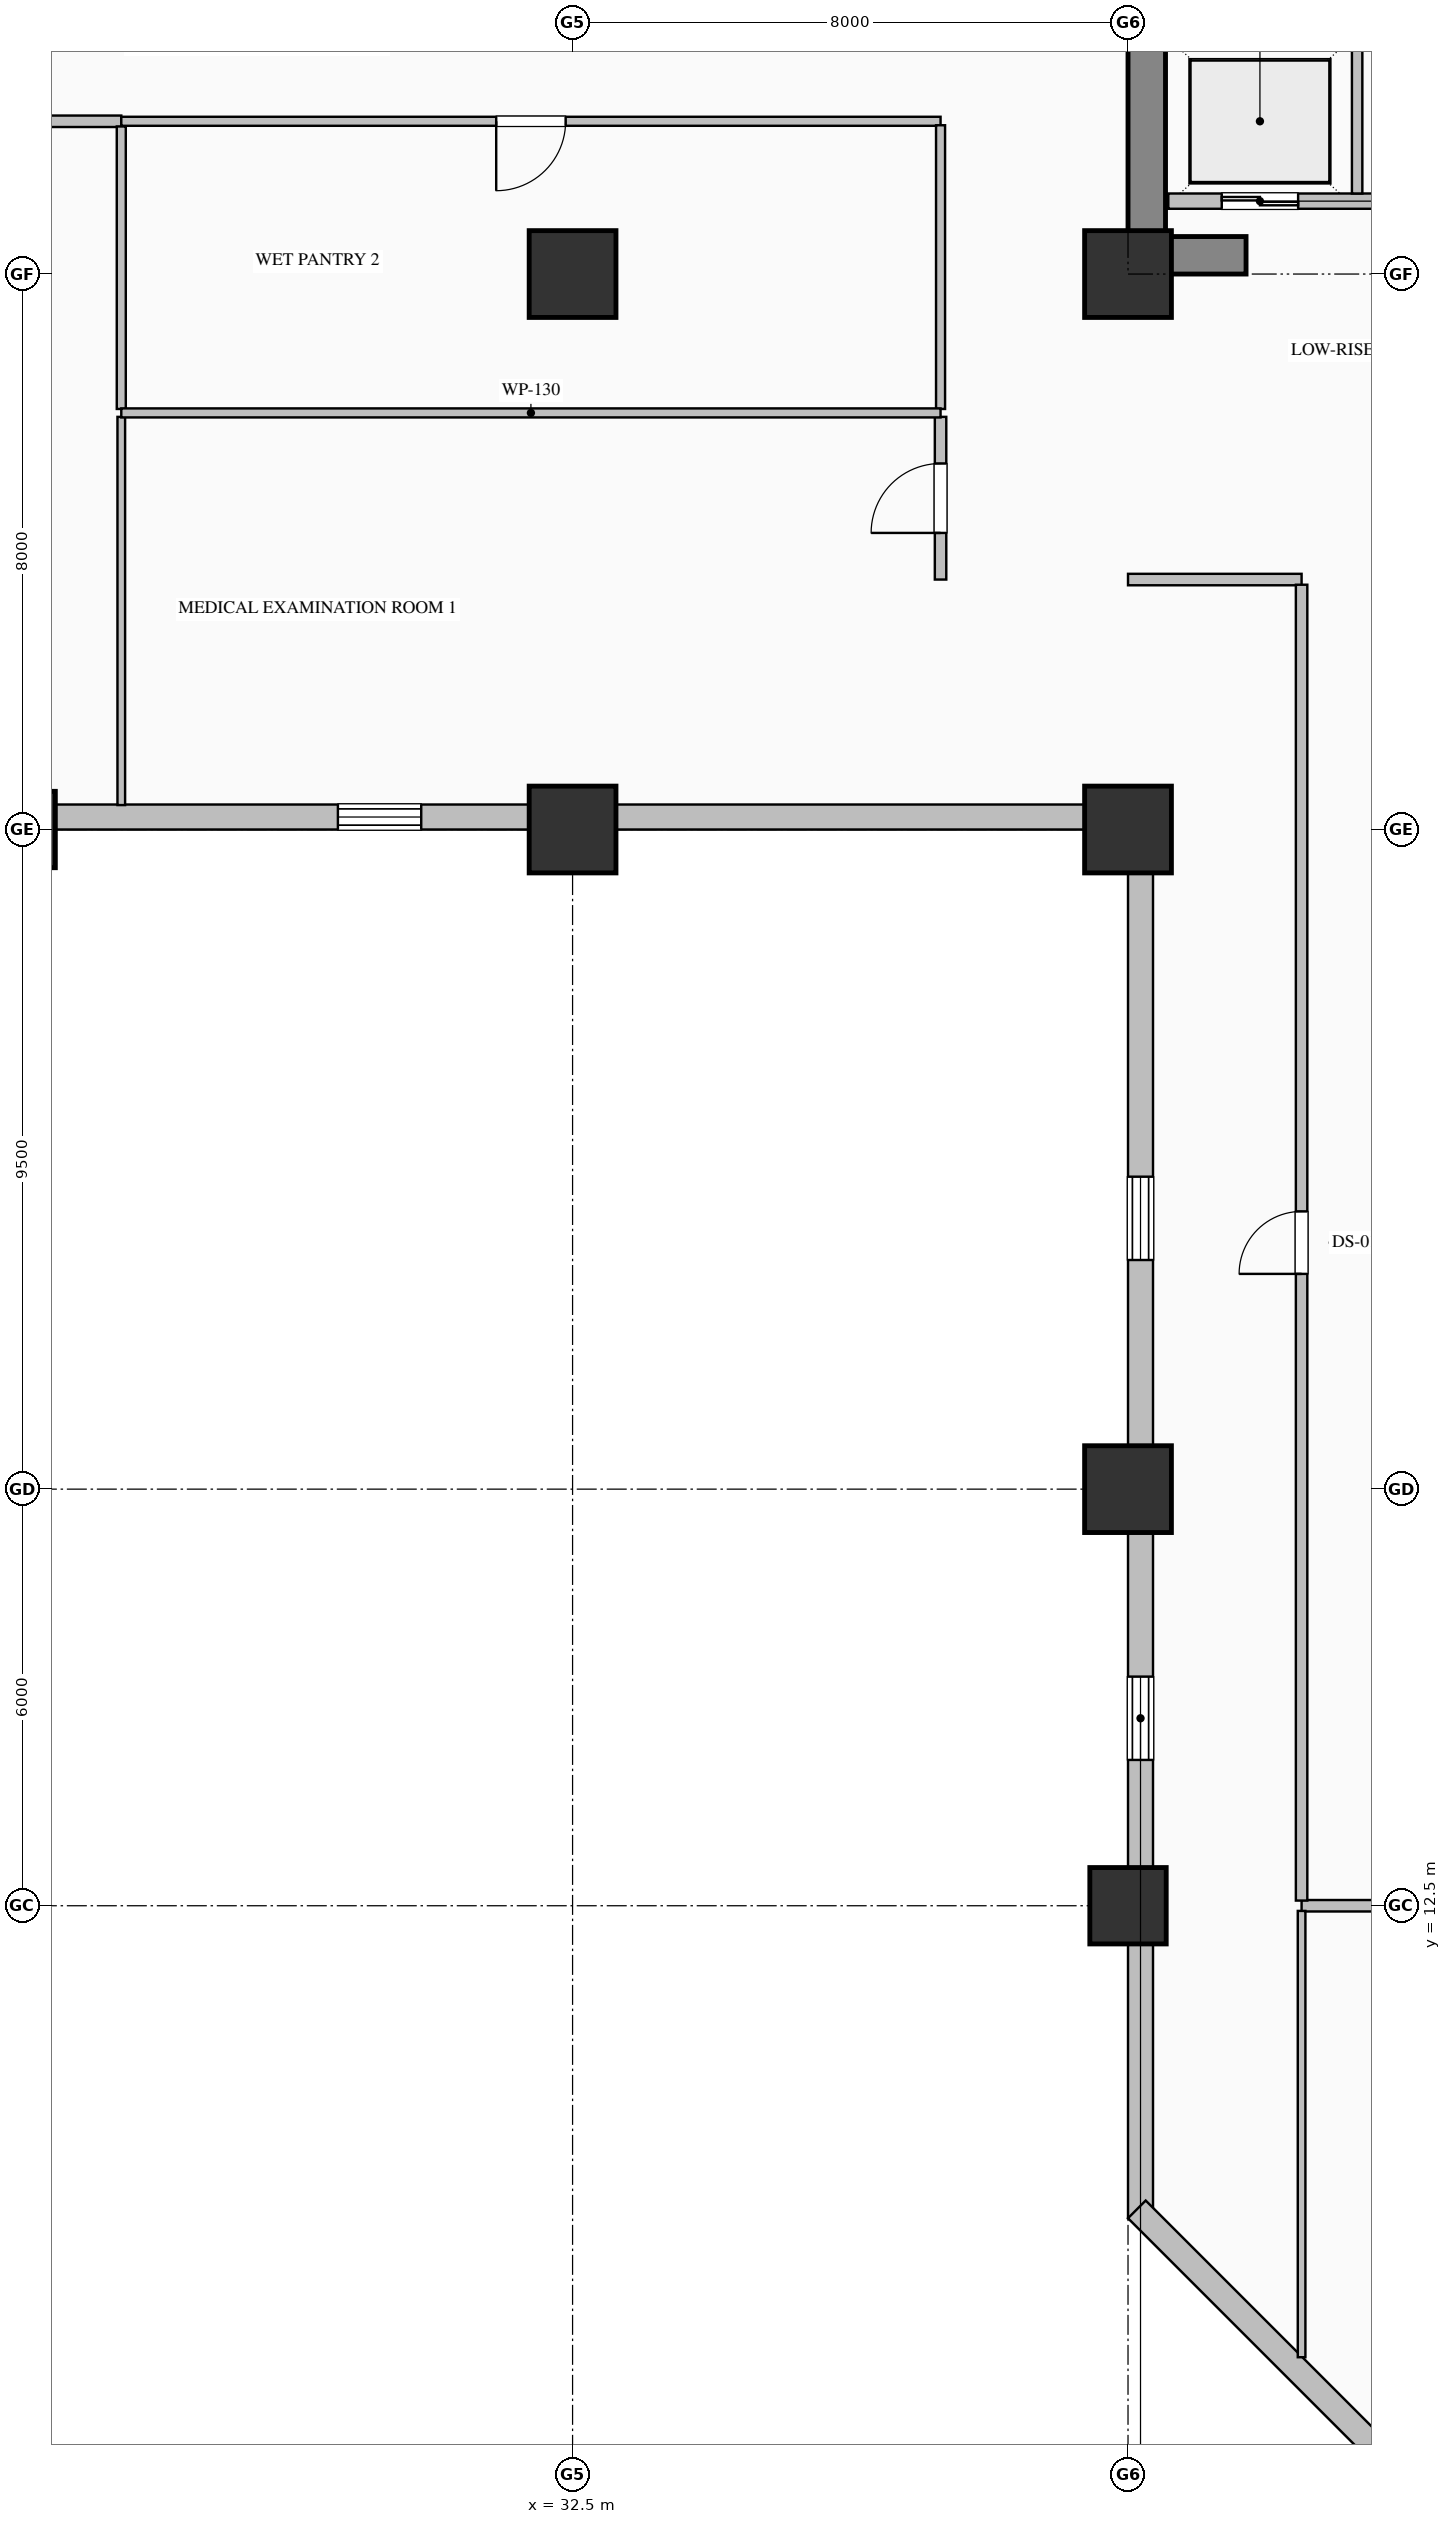
"""IFC4 building model, lengths in metres.
Left out: names, types, materials, properties, quantities, classifications, styles, units other than length and angle.
Written with IfcOpenShell. Run it as: python <this file> out.ifc"""

import sys

from ifc_helpers import new_model, si_unit, direction, frame, frame_2d, origin, origin_2d, place, context, subcontext, project, spatial, rectangle, hollow_rectangle, extrude, element, fill, save


model = new_model("IFC4")
c1 = context("Model", 3, precision=1e-05, world=origin(), true_north=direction((0.0, 1.0)))
c2 = subcontext(c1, "Body", "Model", "MODEL_VIEW")
j1 = project(units=[si_unit("LENGTHUNIT", "METRE"), si_unit("PLANEANGLEUNIT", "RADIAN")], contexts=[c1])
p1 = place(None, origin())
s1 = spatial("IfcSite", under=j1, at=p1, CompositionType="ELEMENT")
p2 = place(p1, origin())
s2 = spatial("IfcBuilding", under=s1, at=p2, CompositionType="ELEMENT")
p3 = place(p2, frame((0.0, 0.0, 88.2)))
s3 = spatial("IfcBuildingStorey", under=s2, at=p3, CompositionType="ELEMENT", Elevation=88.2)
p4 = place(p3, frame((40.77, 36.54, 0.0), z_axis=(0.0, 0.0, 1.0), x_axis=(0.0, 1.0, 0.0)))
e1 = element("IfcWall", 1, at=p4, inside=s3, PredefinedType="SHEAR", context=c2, shape_type="SweptSolid", body=[
    extrude(rectangle(XDim=7.86, YDim=0.54, at=frame_2d((3.93, 0.0))), origin(), (0.0, 0.0, 1.0), 3.75),
])
p5 = place(p3, frame((40.5, 36.27, 0.0), z_axis=(0.0, 0.0, 1.0), x_axis=(1.0, 0.0, 0.0)))
e2 = element("IfcWall", 2, at=p5, inside=s3, PredefinedType="SHEAR", context=c2, shape_type="SweptSolid", body=[
    extrude(rectangle(XDim=1.7, YDim=0.54, at=frame_2d((0.85, 0.0))), origin(), (0.0, 0.0, 1.0), 3.75),
])
p6 = place(p3, frame((24.5, 28.0, 0.0), z_axis=(0.0, 0.0, 1.0), x_axis=(1.0, 0.0, 0.0)))
e3 = element("IfcColumn", 3, at=p6, inside=s3, PredefinedType="COLUMN", context=c2, shape_type="SweptSolid", body=[
    extrude(hollow_rectangle(XDim=1.1, YDim=1.1, WallThickness=0.04, at=origin_2d()), origin(), (0.0, 0.0, 1.0), 4.0),
])
for number, where, z_axis, x_axis in (
    (4, (32.5, 28.0, 0.0), (0.0, 0.0, 1.0), (1.0, 0.0, 0.0)),
    (5, (32.5, 36.0, 0.0), (0.0, 0.0, 1.0), (1.0, 0.0, 0.0)),
):
    element("IfcColumn", number, at=place(p3, frame(where, z_axis=z_axis, x_axis=x_axis)), inside=s3, PredefinedType="COLUMN", context=c2, shape_type="SweptSolid", body=[
        extrude(hollow_rectangle(XDim=1.25, YDim=1.25, WallThickness=0.045, at=origin_2d()), origin(), (0.0, 0.0, 1.0), 4.0),
    ])
p7 = place(p3, frame((40.5, 12.5, 0.0), z_axis=(0.0, 0.0, 1.0), x_axis=(1.0, 0.0, 0.0)))
e6 = element("IfcColumn", 6, at=p7, inside=s3, PredefinedType="COLUMN", context=c2, shape_type="SweptSolid", body=[
    extrude(hollow_rectangle(XDim=1.1, YDim=1.1, WallThickness=0.04, at=origin_2d()), origin(), (0.0, 0.0, 1.0), 4.0),
])
for number, where, z_axis, x_axis in (
    (7, (40.5, 18.5, 0.0), (0.0, 0.0, 1.0), (1.0, 0.0, 0.0)),
    (8, (40.5, 28.0, 0.0), (0.0, 0.0, 1.0), (1.0, 0.0, 0.0)),
    (9, (40.5, 36.0, 0.0), (0.0, 0.0, 1.0), (1.0, 0.0, 0.0)),
):
    element("IfcColumn", number, at=place(p3, frame(where, z_axis=z_axis, x_axis=x_axis)), inside=s3, PredefinedType="COLUMN", context=c2, shape_type="SweptSolid", body=[
        extrude(hollow_rectangle(XDim=1.25, YDim=1.25, WallThickness=0.045, at=origin_2d()), origin(), (0.0, 0.0, 1.0), 4.0),
    ])
p8 = place(p3, frame((40.68, 8.0, 0.0), z_axis=(0.0, 0.0, 1.0), x_axis=(0.0, 1.0, 0.0)))
e10 = element("IfcWall", 10, at=p8, inside=s3, PredefinedType="SOLIDWALL", context=c2, shape_type="SweptSolid", body=[
    extrude(rectangle(XDim=20.36, YDim=0.36, at=frame_2d((10.18, 0.0))), origin(), (0.0, 0.0, 1.0), 3.05),
])
p9 = place(p8, frame((6.6, 0.0, 0.7)))
e11 = element("IfcOpeningElement", 11, at=p9, cuts=e10, PredefinedType="OPENING", context=c2, shape_type="SweptSolid", body=[
    extrude(rectangle(XDim=1.2, YDim=1.85, at=frame_2d((0.6, 0.925))), frame((0.0, 0.19, 0.0), z_axis=(0.0, -1.0, 0.0), x_axis=(1.0, 0.0, 0.0)), (0.0, 0.0, 1.0), 0.38),
])
p10 = place(p8, frame((13.8, 0.0, 0.7)))
e12 = element("IfcOpeningElement", 12, at=p10, cuts=e10, PredefinedType="OPENING", context=c2, shape_type="SweptSolid", body=[
    extrude(rectangle(XDim=1.2, YDim=1.85, at=frame_2d((0.6, 0.925))), frame((0.0, 0.19, 0.0), z_axis=(0.0, -1.0, 0.0), x_axis=(1.0, 0.0, 0.0)), (0.0, 0.0, 1.0), 0.38),
])
p11 = place(p3, frame((40.52, 28.18, 0.0), z_axis=(0.0, 0.0, 1.0), x_axis=(-1.0, 0.0, 0.0)))
e13 = element("IfcWall", 13, at=p11, inside=s3, PredefinedType="SOLIDWALL", context=c2, shape_type="SweptSolid", body=[
    extrude(rectangle(XDim=36.52, YDim=0.36, at=frame_2d((18.26, 0.0))), origin(), (0.0, 0.0, 1.0), 3.05),
])
p12 = place(p11, frame((10.2, 0.0, 0.7)))
e14 = element("IfcOpeningElement", 14, at=p12, cuts=e13, PredefinedType="OPENING", context=c2, shape_type="SweptSolid", body=[
    extrude(rectangle(XDim=1.2, YDim=1.85, at=frame_2d((0.6, 0.925))), frame((0.0, 0.19, 0.0), z_axis=(0.0, -1.0, 0.0), x_axis=(1.0, 0.0, 0.0)), (0.0, 0.0, 1.0), 0.38),
])
p13 = place(p11, frame((17.4, 0.0, 0.7)))
e15 = element("IfcOpeningElement", 15, at=p13, cuts=e13, PredefinedType="OPENING", context=c2, shape_type="SweptSolid", body=[
    extrude(rectangle(XDim=1.2, YDim=1.85, at=frame_2d((0.6, 0.925))), frame((0.0, 0.19, 0.0), z_axis=(0.0, -1.0, 0.0), x_axis=(1.0, 0.0, 0.0)), (0.0, 0.0, 1.0), 0.38),
])
p14 = place(p11, frame((21.0, 0.0, 0.7)))
e16 = element("IfcOpeningElement", 16, at=p14, cuts=e13, PredefinedType="OPENING", context=c2, shape_type="SweptSolid", body=[
    extrude(rectangle(XDim=1.2, YDim=1.85, at=frame_2d((0.6, 0.925))), frame((0.0, 0.19, 0.0), z_axis=(0.0, -1.0, 0.0), x_axis=(1.0, 0.0, 0.0)), (0.0, 0.0, 1.0), 0.38),
])
p15 = place(p11, frame((28.2, 0.0, 0.7)))
e17 = element("IfcOpeningElement", 17, at=p15, cuts=e13, PredefinedType="OPENING", context=c2, shape_type="SweptSolid", body=[
    extrude(rectangle(XDim=1.2, YDim=1.85, at=frame_2d((0.6, 0.925))), frame((0.0, 0.19, 0.0), z_axis=(0.0, -1.0, 0.0), x_axis=(1.0, 0.0, 0.0)), (0.0, 0.0, 1.0), 0.38),
])
p16 = place(p3, frame((44.627, 4.127, 0.0), z_axis=(0.0, 0.0, 1.0), x_axis=(-0.707106781187, 0.707106781187, 0.0)))
e18 = element("IfcWall", 18, at=p16, inside=s3, PredefinedType="SOLIDWALL", context=c2, shape_type="SweptSolid", body=[
    extrude(rectangle(XDim=5.657, YDim=0.36, at=frame_2d((2.828, 0.0))), origin(), (0.0, 0.0, 1.0), 3.75),
])
p17 = place(p3, frame((49.32, 37.05, 0.0), z_axis=(0.0, 0.0, 1.0), x_axis=(-1.0, 0.0, 0.0)))
e19 = element("IfcWall", 19, at=p17, inside=s3, PredefinedType="PARTITIONING", context=c2, shape_type="SweptSolid", body=[
    extrude(rectangle(XDim=8.24, YDim=0.22, at=frame_2d((4.12, 0.0))), origin(), (0.0, 0.0, 1.0), 3.75),
])
p18 = place(p17, frame((6.37, 0.0, 0.0)))
e20 = element("IfcOpeningElement", 20, at=p18, cuts=e19, PredefinedType="OPENING", context=c2, shape_type="SweptSolid", body=[
    extrude(rectangle(XDim=1.1, YDim=2.2, at=frame_2d((0.55, 1.1))), frame((0.0, 0.12, 0.0), z_axis=(0.0, -1.0, 0.0), x_axis=(1.0, 0.0, 0.0)), (0.0, 0.0, 1.0), 0.24),
])
p19 = place(p17, frame((3.57, 0.0, 0.0)))
e21 = element("IfcOpeningElement", 21, at=p19, cuts=e19, PredefinedType="OPENING", context=c2, shape_type="SweptSolid", body=[
    extrude(rectangle(XDim=1.1, YDim=2.2, at=frame_2d((0.55, 1.1))), frame((0.0, 0.12, 0.0), z_axis=(0.0, -1.0, 0.0), x_axis=(1.0, 0.0, 0.0)), (0.0, 0.0, 1.0), 0.24),
])
p20 = place(p17, frame((0.77, 0.0, 0.0)))
e22 = element("IfcOpeningElement", 22, at=p20, cuts=e19, PredefinedType="OPENING", context=c2, shape_type="SweptSolid", body=[
    extrude(rectangle(XDim=1.1, YDim=2.2, at=frame_2d((0.55, 1.1))), frame((0.0, 0.12, 0.0), z_axis=(0.0, -1.0, 0.0), x_axis=(1.0, 0.0, 0.0)), (0.0, 0.0, 1.0), 0.24),
])
p21 = place(p3, frame((43.8, 37.16, 0.0), z_axis=(0.0, 0.0, 1.0), x_axis=(0.0, 1.0, 0.0)))
e23 = element("IfcWall", 23, at=p21, inside=s3, PredefinedType="PARTITIONING", context=c2, shape_type="SweptSolid", body=[
    extrude(rectangle(XDim=2.08, YDim=0.15, at=frame_2d((1.04, 0.0))), origin(), (0.0, 0.0, 1.0), 3.75),
])
p22 = place(p3, frame((26.0, 38.2, 0.0), z_axis=(0.0, 0.0, 1.0), x_axis=(-1.0, 0.0, 0.0)))
e24 = element("IfcWall", 24, at=p22, inside=s3, PredefinedType="PARTITIONING", context=c2, shape_type="SweptSolid", body=[
    extrude(rectangle(XDim=17.0, YDim=0.165, at=frame_2d((8.5, 0.0))), origin(), (0.0, 0.0, 1.0), 3.75),
])
p23 = place(p22, frame((7.5, 0.0, 0.0)))
e25 = element("IfcOpeningElement", 25, at=p23, cuts=e24, PredefinedType="OPENING", context=c2, shape_type="SweptSolid", body=[
    extrude(rectangle(XDim=2.0, YDim=2.4, at=frame_2d((1.0, 1.2))), frame((0.0, 0.093, 0.0), z_axis=(0.0, -1.0, 0.0), x_axis=(1.0, 0.0, 0.0)), (0.0, 0.0, 1.0), 0.185),
])
p24 = place(p3, frame((37.8, 38.2, 0.0), z_axis=(0.0, 0.0, 1.0), x_axis=(-1.0, 0.0, 0.0)))
e26 = element("IfcWall", 26, at=p24, inside=s3, PredefinedType="PARTITIONING", context=c2, shape_type="SweptSolid", body=[
    extrude(rectangle(XDim=11.8, YDim=0.13, at=frame_2d((5.9, 0.0))), origin(), (0.0, 0.0, 1.0), 3.75),
])
p25 = place(p24, frame((5.4, 0.0, 0.0)))
e27 = element("IfcOpeningElement", 27, at=p25, cuts=e26, PredefinedType="OPENING", context=c2, shape_type="SweptSolid", body=[
    extrude(rectangle(XDim=1.0, YDim=2.15, at=frame_2d((0.5, 1.075))), frame((0.0, 0.075, 0.0), z_axis=(0.0, -1.0, 0.0), x_axis=(1.0, 0.0, 0.0)), (0.0, 0.0, 1.0), 0.15),
])
p26 = place(p3, frame((37.8, 31.6, 0.0), z_axis=(0.0, 0.0, 1.0), x_axis=(0.0, 1.0, 0.0)))
e28 = element("IfcWall", 28, at=p26, inside=s3, PredefinedType="PARTITIONING", context=c2, shape_type="SweptSolid", body=[
    extrude(rectangle(XDim=2.343, YDim=0.165, at=frame_2d((1.171, 0.0))), origin(), (0.0, 0.0, 1.0), 3.75),
])
p27 = place(p26, frame((0.671, 0.0, 0.0)))
e29 = element("IfcOpeningElement", 29, at=p27, cuts=e28, PredefinedType="OPENING", context=c2, shape_type="SweptSolid", body=[
    extrude(rectangle(XDim=1.0, YDim=2.15, at=frame_2d((0.5, 1.075))), frame((0.0, 0.093, 0.0), z_axis=(0.0, -1.0, 0.0), x_axis=(1.0, 0.0, 0.0)), (0.0, 0.0, 1.0), 0.185),
])
p28 = place(p3, frame((37.8, 34.057, 0.0), z_axis=(0.0, 0.0, 1.0), x_axis=(0.0, 1.0, 0.0)))
e30 = element("IfcWall", 30, at=p28, inside=s3, PredefinedType="PARTITIONING", context=c2, shape_type="SweptSolid", body=[
    extrude(rectangle(XDim=4.086, YDim=0.13, at=frame_2d((2.043, 0.0))), origin(), (0.0, 0.0, 1.0), 3.75),
])
p29 = place(p3, frame((43.0, 31.6, 0.0), z_axis=(0.0, 0.0, 1.0), x_axis=(-1.0, 0.0, 0.0)))
e31 = element("IfcWall", 31, at=p29, inside=s3, PredefinedType="PARTITIONING", context=c2, shape_type="SweptSolid", body=[
    extrude(rectangle(XDim=2.5, YDim=0.165, at=frame_2d((1.25, 0.0))), origin(), (0.0, 0.0, 1.0), 3.75),
])
p30 = place(p3, frame((45.2, 12.5, 0.0), z_axis=(0.0, 0.0, 1.0), x_axis=(-1.0, 0.0, 0.0)))
e32 = element("IfcWall", 32, at=p30, inside=s3, PredefinedType="PARTITIONING", context=c2, shape_type="SweptSolid", body=[
    extrude(rectangle(XDim=2.2, YDim=0.165, at=frame_2d((1.1, 0.0))), origin(), (0.0, 0.0, 1.0), 3.042),
])
p31 = place(p3, frame((43.0, 12.574, 0.0), z_axis=(0.0, 0.0, 1.0), x_axis=(0.0, 1.0, 0.0)))
e33 = element("IfcWall", 33, at=p31, inside=s3, PredefinedType="PARTITIONING", context=c2, shape_type="SweptSolid", body=[
    extrude(rectangle(XDim=18.951, YDim=0.165, at=frame_2d((9.476, 0.0))), origin(), (0.0, 0.0, 1.0), 3.75),
])
p32 = place(p31, frame((9.025, 0.0, 0.0)))
e34 = element("IfcOpeningElement", 34, at=p32, cuts=e33, PredefinedType="OPENING", context=c2, shape_type="SweptSolid", body=[
    extrude(rectangle(XDim=0.9, YDim=2.15, at=frame_2d((0.45, 1.075))), frame((0.0, 0.093, 0.0), z_axis=(0.0, -1.0, 0.0), x_axis=(1.0, 0.0, 0.0)), (0.0, 0.0, 1.0), 0.185),
])
p33 = place(p3, frame((43.0, 5.998, 0.0), z_axis=(0.0, 0.0, 1.0), x_axis=(0.0, 1.0, 0.0)))
e35 = element("IfcWall", 35, at=p33, inside=s3, PredefinedType="MOVABLE", context=c2, shape_type="SweptSolid", body=[
    extrude(rectangle(XDim=6.428, YDim=0.11, at=frame_2d((3.214, 0.0))), origin(), (0.0, 0.0, 1.0), 3.75),
])
p34 = place(p3, frame((26.0, 33.943, 0.0), z_axis=(0.0, 0.0, 1.0), x_axis=(0.0, -1.0, 0.0)))
e36 = element("IfcWall", 36, at=p34, inside=s3, PredefinedType="MOVABLE", context=c2, shape_type="SweptSolid", body=[
    extrude(rectangle(XDim=5.591, YDim=0.11, at=frame_2d((2.795, 0.0))), origin(), (0.0, 0.0, 1.0), 3.75),
])
p35 = place(p3, frame((26.0, 38.125, 0.0), z_axis=(0.0, 0.0, 1.0), x_axis=(0.0, -1.0, 0.0)))
e37 = element("IfcWall", 37, at=p35, inside=s3, PredefinedType="PARTITIONING", context=c2, shape_type="SweptSolid", body=[
    extrude(rectangle(XDim=4.069, YDim=0.13, at=frame_2d((2.034, 0.0))), origin(), (0.0, 0.0, 1.0), 3.75),
])
p36 = place(p3, frame((26.0, 34.0, 0.0), z_axis=(0.0, 0.0, 1.0), x_axis=(1.0, 0.0, 0.0)))
e38 = element("IfcWall", 38, at=p36, inside=s3, PredefinedType="PARTITIONING", context=c2, shape_type="SweptSolid", body=[
    extrude(rectangle(XDim=11.8, YDim=0.13, at=frame_2d((5.9, 0.0))), origin(), (0.0, 0.0, 1.0), 3.75),
])
p37 = place(p9, origin())
e39 = element("IfcWindow", 39, at=p37, inside=s3, PartitioningType="DOUBLE_PANEL_VERTICAL", PredefinedType="WINDOW", context=c2, shape_type="SweptSolid", body=[
    extrude(rectangle(XDim=1.2, YDim=1.85, at=frame_2d((0.6, 0.925))), frame((0.0, 0.15, 0.0), z_axis=(0.0, -1.0, 0.0), x_axis=(1.0, 0.0, 0.0)), (0.0, 0.0, 1.0), 0.06),
])
fill(e11, e39)
p38 = place(p10, origin())
e40 = element("IfcWindow", 40, at=p38, inside=s3, PartitioningType="DOUBLE_PANEL_VERTICAL", PredefinedType="WINDOW", context=c2, shape_type="SweptSolid", body=[
    extrude(rectangle(XDim=1.2, YDim=1.85, at=frame_2d((0.6, 0.925))), frame((0.0, 0.15, 0.0), z_axis=(0.0, -1.0, 0.0), x_axis=(1.0, 0.0, 0.0)), (0.0, 0.0, 1.0), 0.06),
])
fill(e12, e40)
p39 = place(p12, origin())
e41 = element("IfcWindow", 41, at=p39, inside=s3, PartitioningType="DOUBLE_PANEL_VERTICAL", PredefinedType="WINDOW", context=c2, shape_type="SweptSolid", body=[
    extrude(rectangle(XDim=1.2, YDim=1.85, at=frame_2d((0.6, 0.925))), frame((0.0, 0.15, 0.0), z_axis=(0.0, -1.0, 0.0), x_axis=(1.0, 0.0, 0.0)), (0.0, 0.0, 1.0), 0.06),
])
fill(e14, e41)
p40 = place(p18, origin())
e42 = element("IfcDoor", 42, at=p40, inside=s3, OperationType="DOUBLE_DOOR_SLIDING", PredefinedType="DOOR", context=c2, shape_type="SweptSolid", body=[
    extrude(rectangle(XDim=1.1, YDim=2.2, at=frame_2d((0.55, 1.1))), frame((0.0, 0.025, 0.0), z_axis=(0.0, -1.0, 0.0), x_axis=(1.0, 0.0, 0.0)), (0.0, 0.0, 1.0), 0.05),
])
fill(e20, e42)
p41 = place(p27, origin())
e43 = element("IfcDoor", 43, at=p41, inside=s3, OperationType="SINGLE_SWING_LEFT", PredefinedType="DOOR", context=c2, shape_type="SweptSolid", body=[
    extrude(rectangle(XDim=1.0, YDim=2.15, at=frame_2d((0.5, 1.075))), frame((0.0, 0.025, 0.0), z_axis=(0.0, -1.0, 0.0), x_axis=(1.0, 0.0, 0.0)), (0.0, 0.0, 1.0), 0.05),
])
fill(e29, e43)
p42 = place(p25, origin())
e44 = element("IfcDoor", 44, at=p42, inside=s3, OperationType="SINGLE_SWING_RIGHT", PredefinedType="DOOR", context=c2, shape_type="SweptSolid", body=[
    extrude(rectangle(XDim=1.0, YDim=2.15, at=frame_2d((0.5, 1.075))), frame((0.0, 0.025, 0.0), z_axis=(0.0, -1.0, 0.0), x_axis=(1.0, 0.0, 0.0)), (0.0, 0.0, 1.0), 0.05),
])
fill(e27, e44)
p43 = place(p32, origin())
e45 = element("IfcDoor", 45, at=p43, inside=s3, OperationType="SINGLE_SWING_LEFT", PredefinedType="DOOR", context=c2, shape_type="SweptSolid", body=[
    extrude(rectangle(XDim=0.9, YDim=2.15, at=frame_2d((0.45, 1.075))), frame((0.0, 0.025, 0.0), z_axis=(0.0, -1.0, 0.0), x_axis=(1.0, 0.0, 0.0)), (0.0, 0.0, 1.0), 0.05),
])
fill(e34, e45)
save(model, sys.argv[1])
